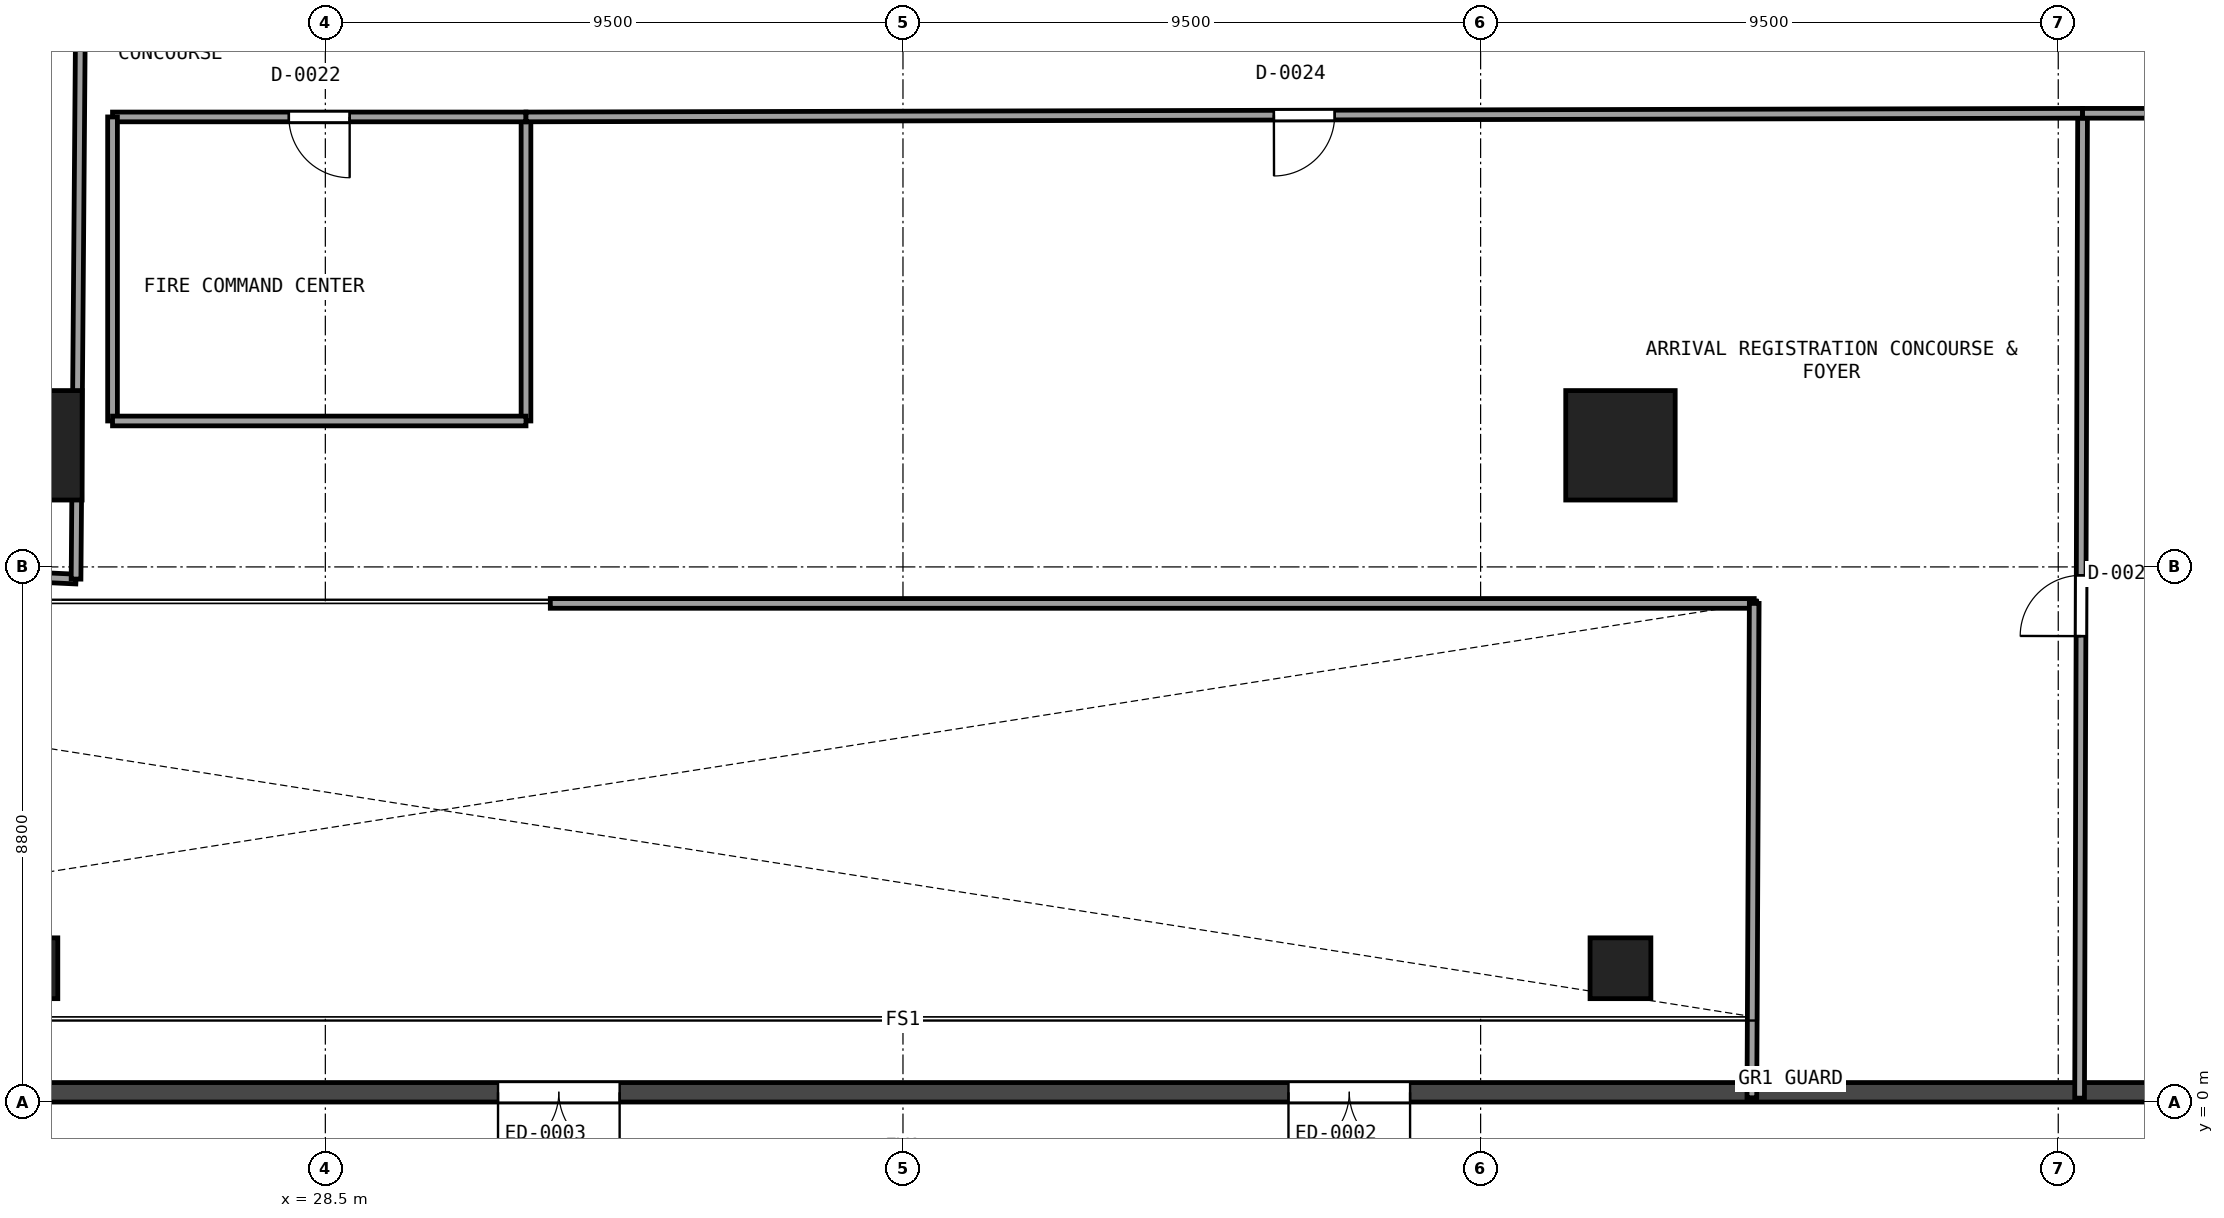
"""IFC4 building model, lengths in metres.
Left out: names, types, materials, properties, quantities, classifications, styles, units other than length and angle.
Written with IfcOpenShell. Run it as: python <this file> out.ifc"""

import sys

from ifc_helpers import new_model, si_unit, direction, frame, frame_2d, origin, origin_2d, place, context, subcontext, project, spatial, rectangle, extrude, element, fill, save


model = new_model("IFC4")
c1 = context("Model", 3, precision=1e-05, world=origin(), true_north=direction((0.0, 1.0)))
c2 = subcontext(c1, "Body", "Model", "MODEL_VIEW")
j1 = project(units=[si_unit("LENGTHUNIT", "METRE"), si_unit("PLANEANGLEUNIT", "RADIAN")], contexts=[c1])
p1 = place(None, origin())
s1 = spatial("IfcSite", under=j1, at=p1, CompositionType="ELEMENT")
p2 = place(p1, origin())
s2 = spatial("IfcBuilding", under=s1, at=p2, CompositionType="ELEMENT")
p3 = place(p2, origin())
s3 = spatial("IfcBuildingStorey", under=s2, at=p3, CompositionType="ELEMENT", Elevation=0.0)
for number, where, z_axis, x_axis in (
    (1, (23.6, 10.8, 0.0), (0.0, 0.0, 1.0), (1.0, 0.0, 0.0)),
    (2, (49.8, 10.8, 0.0), (0.0, 0.0, 1.0), (1.0, 0.0, 0.0)),
):
    element("IfcColumn", number, at=place(p3, frame(where, z_axis=z_axis, x_axis=x_axis)), inside=s3, PredefinedType="COLUMN", context=c2, shape_type="SweptSolid", body=[
        extrude(rectangle(XDim=1.8, YDim=1.8, at=origin_2d()), origin(), (0.0, 0.0, 1.0), 5.05),
    ])
for number, where, z_axis, x_axis in (
    (3, (23.6, 2.2, -0.33), (0.0, 0.0, 1.0), (1.0, 0.0, 0.0)),
    (4, (49.8, 2.2, -0.33), (0.0, 0.0, 1.0), (1.0, 0.0, 0.0)),
):
    element("IfcColumn", number, at=place(p3, frame(where, z_axis=z_axis, x_axis=x_axis)), inside=s3, PredefinedType="COLUMN", context=c2, shape_type="SweptSolid", body=[
        extrude(rectangle(XDim=1.0, YDim=1.0, at=origin_2d()), origin(), (0.0, 0.0, 1.0), 5.38),
    ])
p4 = place(p3, frame((75.84, 0.16, 0.0), z_axis=(0.0, 0.0, 1.0), x_axis=(-1.0, 0.0, 0.0)))
e5 = element("IfcWall", 5, at=p4, inside=s3, PredefinedType="SOLIDWALL", context=c2, shape_type="SweptSolid", body=[
    extrude(rectangle(XDim=75.68, YDim=0.32, at=frame_2d((37.84, 0.0))), origin(), (0.0, 0.0, 1.0), 5.05),
])
p5 = place(p4, frame((15.0, 0.0, 0.0)))
e6 = element("IfcOpeningElement", 6, at=p5, cuts=e5, PredefinedType="OPENING", context=c2, shape_type="SweptSolid", body=[
    extrude(rectangle(XDim=2.0, YDim=2.4, at=frame_2d((1.0, 1.2))), frame((0.0, 0.17, 0.0), z_axis=(0.0, -1.0, 0.0), x_axis=(1.0, 0.0, 0.0)), (0.0, 0.0, 1.0), 0.34),
])
p6 = place(p4, frame((29.5, 0.0, 0.0)))
e7 = element("IfcOpeningElement", 7, at=p6, cuts=e5, PredefinedType="OPENING", context=c2, shape_type="SweptSolid", body=[
    extrude(rectangle(XDim=2.0, YDim=2.4, at=frame_2d((1.0, 1.2))), frame((0.0, 0.17, 0.0), z_axis=(0.0, -1.0, 0.0), x_axis=(1.0, 0.0, 0.0)), (0.0, 0.0, 1.0), 0.34),
])
p7 = place(p4, frame((42.5, 0.0, 0.0)))
e8 = element("IfcOpeningElement", 8, at=p7, cuts=e5, PredefinedType="OPENING", context=c2, shape_type="SweptSolid", body=[
    extrude(rectangle(XDim=2.0, YDim=2.4, at=frame_2d((1.0, 1.2))), frame((0.0, 0.17, 0.0), z_axis=(0.0, -1.0, 0.0), x_axis=(1.0, 0.0, 0.0)), (0.0, 0.0, 1.0), 0.34),
])
p8 = place(p4, frame((58.0, 0.0, 0.0)))
e9 = element("IfcOpeningElement", 9, at=p8, cuts=e5, PredefinedType="OPENING", context=c2, shape_type="SweptSolid", body=[
    extrude(rectangle(XDim=2.0, YDim=2.4, at=frame_2d((1.0, 1.2))), frame((0.0, 0.17, 0.0), z_axis=(0.0, -1.0, 0.0), x_axis=(1.0, 0.0, 0.0)), (0.0, 0.0, 1.0), 0.34),
])
p9 = place(p3, frame((31.8, 11.2, 0.0), z_axis=(0.0, 0.0, 1.0), x_axis=(0.0, 1.0, 0.0)))
e10 = element("IfcWall", 10, at=p9, inside=s3, PredefinedType="PARTITIONING", context=c2, shape_type="SweptSolid", body=[
    extrude(rectangle(XDim=5.0, YDim=0.16, at=frame_2d((2.5, 0.0))), origin(), (0.0, 0.0, 1.0), 5.05),
])
p10 = place(p3, frame((31.8, 16.2, 0.0), z_axis=(0.0, 0.0, 1.0), x_axis=(-1.0, 0.0, 0.0)))
e11 = element("IfcWall", 11, at=p10, inside=s3, PredefinedType="PARTITIONING", context=c2, shape_type="SweptSolid", body=[
    extrude(rectangle(XDim=6.8, YDim=0.16, at=frame_2d((3.4, 0.0))), origin(), (0.0, 0.0, 1.0), 4.135),
])
p11 = place(p10, frame((2.9, 0.0, 0.0)))
e12 = element("IfcOpeningElement", 12, at=p11, cuts=e11, PredefinedType="OPENING", context=c2, shape_type="SweptSolid", body=[
    extrude(rectangle(XDim=1.0, YDim=2.15, at=frame_2d((0.5, 1.075))), frame((0.0, 0.09, 0.0), z_axis=(0.0, -1.0, 0.0), x_axis=(1.0, 0.0, 0.0)), (0.0, 0.0, 1.0), 0.18),
])
p12 = place(p3, frame((25.0, 16.2, 0.0), z_axis=(0.0, 0.0, 1.0), x_axis=(0.0, -1.0, 0.0)))
e13 = element("IfcWall", 13, at=p12, inside=s3, PredefinedType="PARTITIONING", context=c2, shape_type="SweptSolid", body=[
    extrude(rectangle(XDim=5.0, YDim=0.16, at=frame_2d((2.5, 0.0))), origin(), (0.0, 0.0, 1.0), 4.135),
])
p13 = place(p3, frame((25.0, 11.2, 0.0), z_axis=(0.0, 0.0, 1.0), x_axis=(1.0, 0.0, 0.0)))
e14 = element("IfcWall", 14, at=p13, inside=s3, PredefinedType="PARTITIONING", context=c2, shape_type="SweptSolid", body=[
    extrude(rectangle(XDim=6.8, YDim=0.16, at=frame_2d((3.4, 0.0))), origin(), (0.0, 0.0, 1.0), 5.05),
])
p14 = place(p3, frame((0.073, 9.733, 0.0), z_axis=(0.0, 0.0, 1.0), x_axis=(0.998917552656, -0.046515835978, 0.0)))
e15 = element("IfcWall", 15, at=p14, inside=s3, PredefinedType="PARTITIONING", context=c2, shape_type="SweptSolid", body=[
    extrude(rectangle(XDim=24.353, YDim=0.16, at=frame_2d((12.177, 0.0))), origin(), (0.0, 0.0, 1.0), 4.203),
])
p15 = place(p3, frame((24.4, 8.6, 0.0), z_axis=(0.0, 0.0, 1.0), x_axis=(0.007911242618, 0.99996870563, 0.0)))
e16 = element("IfcWall", 16, at=p15, inside=s3, PredefinedType="PARTITIONING", context=c2, shape_type="SweptSolid", body=[
    extrude(rectangle(XDim=15.8, YDim=0.16, at=frame_2d((7.9, 0.0))), origin(), (0.0, 0.0, 1.0), 4.135),
])
p16 = place(p3, frame((32.2, 8.2, 0.0), z_axis=(0.0, 0.0, 1.0), x_axis=(1.0, 0.0, 0.0)))
e17 = element("IfcWall", 17, at=p16, inside=s3, PredefinedType="PARTITIONING", context=c2, shape_type="SweptSolid", body=[
    extrude(rectangle(XDim=19.8, YDim=0.16, at=frame_2d((9.9, 0.0))), origin(), (0.0, 0.0, 1.0), 4.203),
])
p17 = place(p3, frame((52.0, 8.2, 0.0), z_axis=(0.0, 0.0, 1.0), x_axis=(-0.004804749344, -0.999988457125, 0.0)))
e18 = element("IfcWall", 18, at=p17, inside=s3, PredefinedType="PARTITIONING", context=c2, shape_type="SweptSolid", body=[
    extrude(rectangle(XDim=8.13, YDim=0.16, at=frame_2d((4.065, 0.0))), origin(), (0.0, 0.0, 1.0), 5.05),
])
p18 = place(p3, frame((57.351, 0.064, 0.0), z_axis=(0.0, 0.0, 1.0), x_axis=(0.003014804129, 0.999995455468, 0.0)))
e19 = element("IfcWall", 19, at=p18, inside=s3, PredefinedType="PARTITIONING", context=c2, shape_type="SweptSolid", body=[
    extrude(rectangle(XDim=16.196, YDim=0.16, at=frame_2d((8.098, 0.0))), origin(), (0.0, 0.0, 1.0), 4.123),
])
p19 = place(p18, frame((7.598, 0.0, 0.0)))
e20 = element("IfcOpeningElement", 20, at=p19, cuts=e19, PredefinedType="OPENING", context=c2, shape_type="SweptSolid", body=[
    extrude(rectangle(XDim=1.0, YDim=2.15, at=frame_2d((0.5, 1.075))), frame((0.0, 0.09, 0.0), z_axis=(0.0, -1.0, 0.0), x_axis=(1.0, 0.0, 0.0)), (0.0, 0.0, 1.0), 0.18),
])
p20 = place(p3, frame((57.4, 16.26, 0.0), z_axis=(0.0, 0.0, 1.0), x_axis=(-0.999997248031, -0.002346045786, 0.0)))
e21 = element("IfcWall", 21, at=p20, inside=s3, PredefinedType="PARTITIONING", context=c2, shape_type="SweptSolid", body=[
    extrude(rectangle(XDim=25.6, YDim=0.16, at=frame_2d((12.8, 0.0))), origin(), (0.0, 0.0, 1.0), 4.135),
])
p21 = place(p20, frame((12.3, 0.0, 0.0)))
e22 = element("IfcOpeningElement", 22, at=p21, cuts=e21, PredefinedType="OPENING", context=c2, shape_type="SweptSolid", body=[
    extrude(rectangle(XDim=1.0, YDim=2.15, at=frame_2d((0.5, 1.075))), frame((0.0, 0.09, 0.0), z_axis=(0.0, -1.0, 0.0), x_axis=(1.0, 0.0, 0.0)), (0.0, 0.0, 1.0), 0.18),
])
p22 = place(p3, frame((62.69, 16.26, 0.0), z_axis=(0.0, 0.0, 1.0), x_axis=(-1.0, 0.0, 0.0)))
e23 = element("IfcWall", 23, at=p22, inside=s3, PredefinedType="PARTITIONING", context=c2, shape_type="SweptSolid", body=[
    extrude(rectangle(XDim=5.29, YDim=0.16, at=frame_2d((2.645, 0.0))), origin(), (0.0, 0.0, 1.0), 5.05),
])
p23 = place(p6, origin())
e24 = element("IfcDoor", 24, at=p23, inside=s3, OperationType="DOUBLE_DOOR_SINGLE_SWING", PredefinedType="DOOR", context=c2, shape_type="SweptSolid", body=[
    extrude(rectangle(XDim=2.0, YDim=2.4, at=frame_2d((1.0, 1.2))), frame((0.0, 0.025, 0.0), z_axis=(0.0, -1.0, 0.0), x_axis=(1.0, 0.0, 0.0)), (0.0, 0.0, 1.0), 0.05),
])
fill(e7, e24)
p24 = place(p7, origin())
e25 = element("IfcDoor", 25, at=p24, inside=s3, OperationType="DOUBLE_DOOR_SINGLE_SWING", PredefinedType="DOOR", context=c2, shape_type="SweptSolid", body=[
    extrude(rectangle(XDim=2.0, YDim=2.4, at=frame_2d((1.0, 1.2))), frame((0.0, 0.025, 0.0), z_axis=(0.0, -1.0, 0.0), x_axis=(1.0, 0.0, 0.0)), (0.0, 0.0, 1.0), 0.05),
])
fill(e8, e25)
p25 = place(p11, origin())
e26 = element("IfcDoor", 26, at=p25, inside=s3, OperationType="SINGLE_SWING_LEFT", PredefinedType="DOOR", context=c2, shape_type="SweptSolid", body=[
    extrude(rectangle(XDim=1.0, YDim=2.15, at=frame_2d((0.5, 1.075))), frame((0.0, 0.025, 0.0), z_axis=(0.0, -1.0, 0.0), x_axis=(1.0, 0.0, 0.0)), (0.0, 0.0, 1.0), 0.05),
])
fill(e12, e26)
p26 = place(p21, origin())
e27 = element("IfcDoor", 27, at=p26, inside=s3, OperationType="SINGLE_SWING_RIGHT", PredefinedType="DOOR", context=c2, shape_type="SweptSolid", body=[
    extrude(rectangle(XDim=1.0, YDim=2.15, at=frame_2d((0.5, 1.075))), frame((0.0, 0.025, 0.0), z_axis=(0.0, -1.0, 0.0), x_axis=(1.0, 0.0, 0.0)), (0.0, 0.0, 1.0), 0.05),
])
fill(e22, e27)
p27 = place(p19, origin())
e28 = element("IfcDoor", 28, at=p27, inside=s3, OperationType="SINGLE_SWING_LEFT", PredefinedType="DOOR", context=c2, shape_type="SweptSolid", body=[
    extrude(rectangle(XDim=1.0, YDim=2.15, at=frame_2d((0.5, 1.075))), frame((0.0, 0.025, 0.0), z_axis=(0.0, -1.0, 0.0), x_axis=(1.0, 0.0, 0.0)), (0.0, 0.0, 1.0), 0.05),
])
fill(e20, e28)
save(model, sys.argv[1])
